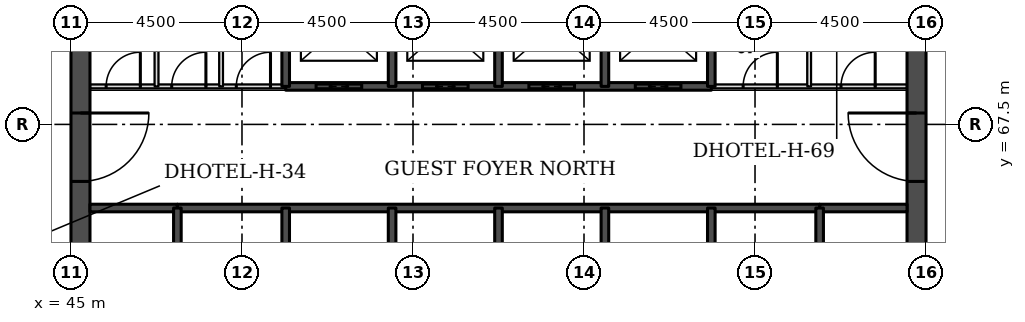
"""IFC4 building model, lengths in metres.
Left out: names, types, materials, properties, quantities, classifications, styles, units other than length and angle.
Written with IfcOpenShell. Run it as: python <this file> out.ifc"""

import sys

from ifc_helpers import new_model, si_unit, direction, frame, frame_2d, origin, place, context, subcontext, project, spatial, rectangle, extrude, element, fill, save


model = new_model("IFC4")
c1 = context("Model", 3, precision=1e-05, world=origin(), true_north=direction((0.0, 1.0)))
c2 = subcontext(c1, "Body", "Model", "MODEL_VIEW")
j1 = project(units=[si_unit("LENGTHUNIT", "METRE"), si_unit("PLANEANGLEUNIT", "RADIAN")], contexts=[c1])
p1 = place(None, origin())
s1 = spatial("IfcSite", under=j1, at=p1, CompositionType="ELEMENT")
p2 = place(p1, origin())
s2 = spatial("IfcBuilding", under=s1, at=p2, CompositionType="ELEMENT")
p3 = place(p2, frame((0.0, 0.0, 46.2)))
s3 = spatial("IfcBuildingStorey", under=s2, at=p3, CompositionType="ELEMENT", Elevation=46.2)
p4 = place(p3, frame((45.25, 49.5, 0.0), z_axis=(0.0, 0.0, 1.0), x_axis=(0.0, 1.0, 0.0)))
e1 = element("IfcWall", 1, at=p4, inside=s3, PredefinedType="SHEAR", context=c2, shape_type="SweptSolid", body=[
    extrude(rectangle(XDim=22.5, YDim=0.5, at=frame_2d((11.25, 0.0))), origin(), (0.0, 0.0, 1.0), 3.3),
])
p5 = place(p4, frame((4.2, 0.0, 0.0)))
e2 = element("IfcOpeningElement", 2, at=p5, cuts=e1, PredefinedType="OPENING", context=c2, shape_type="SweptSolid", body=[
    extrude(rectangle(XDim=1.8, YDim=2.1, at=frame_2d((0.9, 1.05))), frame((0.0, 0.26, 0.0), z_axis=(0.0, -1.0, 0.0), x_axis=(1.0, 0.0, 0.0)), (0.0, 0.0, 1.0), 0.52),
])
p6 = place(p4, frame((6.9, 0.0, 0.0)))
e3 = element("IfcOpeningElement", 3, at=p6, cuts=e1, PredefinedType="OPENING", context=c2, shape_type="SweptSolid", body=[
    extrude(rectangle(XDim=1.1, YDim=2.1, at=frame_2d((0.55, 1.05))), frame((0.0, 0.26, 0.0), z_axis=(0.0, -1.0, 0.0), x_axis=(1.0, 0.0, 0.0)), (0.0, 0.0, 1.0), 0.52),
])
p7 = place(p4, frame((13.6, 0.0, 0.0)))
e4 = element("IfcOpeningElement", 4, at=p7, cuts=e1, PredefinedType="OPENING", context=c2, shape_type="SweptSolid", body=[
    extrude(rectangle(XDim=1.1, YDim=2.1, at=frame_2d((0.55, 1.05))), frame((0.0, 0.26, 0.0), z_axis=(0.0, -1.0, 0.0), x_axis=(1.0, 0.0, 0.0)), (0.0, 0.0, 1.0), 0.52),
])
p8 = place(p4, frame((16.5, 0.0, 0.0)))
e5 = element("IfcOpeningElement", 5, at=p8, cuts=e1, PredefinedType="OPENING", context=c2, shape_type="SweptSolid", body=[
    extrude(rectangle(XDim=1.8, YDim=2.1, at=frame_2d((0.9, 1.05))), frame((0.0, 0.26, 0.0), z_axis=(0.0, -1.0, 0.0), x_axis=(1.0, 0.0, 0.0)), (0.0, 0.0, 1.0), 0.52),
])
p9 = place(p3, frame((67.25, 49.5, 0.0), z_axis=(0.0, 0.0, 1.0), x_axis=(0.0, 1.0, 0.0)))
e6 = element("IfcWall", 6, at=p9, inside=s3, PredefinedType="SHEAR", context=c2, shape_type="SweptSolid", body=[
    extrude(rectangle(XDim=22.5, YDim=0.5, at=frame_2d((11.25, 0.0))), origin(), (0.0, 0.0, 1.0), 3.3),
])
p10 = place(p9, frame((4.2, 0.0, 0.0)))
e7 = element("IfcOpeningElement", 7, at=p10, cuts=e6, PredefinedType="OPENING", context=c2, shape_type="SweptSolid", body=[
    extrude(rectangle(XDim=1.8, YDim=2.1, at=frame_2d((0.9, 1.05))), frame((0.0, 0.26, 0.0), z_axis=(0.0, -1.0, 0.0), x_axis=(1.0, 0.0, 0.0)), (0.0, 0.0, 1.0), 0.52),
])
p11 = place(p9, frame((6.9, 0.0, 0.0)))
e8 = element("IfcOpeningElement", 8, at=p11, cuts=e6, PredefinedType="OPENING", context=c2, shape_type="SweptSolid", body=[
    extrude(rectangle(XDim=1.1, YDim=2.1, at=frame_2d((0.55, 1.05))), frame((0.0, 0.26, 0.0), z_axis=(0.0, -1.0, 0.0), x_axis=(1.0, 0.0, 0.0)), (0.0, 0.0, 1.0), 0.52),
])
p12 = place(p9, frame((13.6, 0.0, 0.0)))
e9 = element("IfcOpeningElement", 9, at=p12, cuts=e6, PredefinedType="OPENING", context=c2, shape_type="SweptSolid", body=[
    extrude(rectangle(XDim=1.1, YDim=2.1, at=frame_2d((0.55, 1.05))), frame((0.0, 0.26, 0.0), z_axis=(0.0, -1.0, 0.0), x_axis=(1.0, 0.0, 0.0)), (0.0, 0.0, 1.0), 0.52),
])
p13 = place(p9, frame((16.5, 0.0, 0.0)))
e10 = element("IfcOpeningElement", 10, at=p13, cuts=e6, PredefinedType="OPENING", context=c2, shape_type="SweptSolid", body=[
    extrude(rectangle(XDim=1.8, YDim=2.1, at=frame_2d((0.9, 1.05))), frame((0.0, 0.26, 0.0), z_axis=(0.0, -1.0, 0.0), x_axis=(1.0, 0.0, 0.0)), (0.0, 0.0, 1.0), 0.52),
])
for number, where, z_axis, x_axis in (
    (11, (45.5, 65.3, 0.0), (0.0, 0.0, 1.0), (1.0, 0.0, 0.0)),
    (12, (64.7, 65.3, 0.0), (0.0, 0.0, 1.0), (1.0, 0.0, 0.0)),
):
    element("IfcWall", number, at=place(p3, frame(where, z_axis=z_axis, x_axis=x_axis)), inside=s3, PredefinedType="SOLIDWALL", context=c2, shape_type="SweptSolid", body=[
        extrude(rectangle(XDim=2.3, YDim=0.2, at=frame_2d((1.15, 0.0))), origin(), (0.0, 0.0, 1.0), 3.08),
    ])
p14 = place(p3, frame((47.8, 65.3, 0.0), z_axis=(0.0, 0.0, 1.0), x_axis=(1.0, 0.0, 0.0)))
e13 = element("IfcWall", 13, at=p14, inside=s3, PredefinedType="SOLIDWALL", context=c2, shape_type="SweptSolid", body=[
    extrude(rectangle(XDim=16.9, YDim=0.2, at=frame_2d((8.45, 0.0))), origin(), (0.0, 0.0, 1.0), 3.08),
])
p15 = place(p3, frame((45.5, 68.5, 0.0), z_axis=(0.0, 0.0, 1.0), x_axis=(1.0, 0.0, 0.0)))
e14 = element("IfcWall", 14, at=p15, inside=s3, PredefinedType="PARTITIONING", context=c2, shape_type="SweptSolid", body=[
    extrude(rectangle(XDim=5.15, YDim=0.1, at=frame_2d((2.575, 0.0))), origin(), (0.0, 0.0, 1.0), 3.08),
])
p16 = place(p15, frame((0.426, 0.0, 0.0)))
e15 = element("IfcOpeningElement", 15, at=p16, cuts=e14, PredefinedType="OPENING", context=c2, shape_type="SweptSolid", body=[
    extrude(rectangle(XDim=0.9, YDim=2.1, at=frame_2d((0.45, 1.05))), frame((0.0, 0.06, 0.0), z_axis=(0.0, -1.0, 0.0), x_axis=(1.0, 0.0, 0.0)), (0.0, 0.0, 1.0), 0.12),
])
p17 = place(p15, frame((2.151, 0.0, 0.0)))
e16 = element("IfcOpeningElement", 16, at=p17, cuts=e14, PredefinedType="OPENING", context=c2, shape_type="SweptSolid", body=[
    extrude(rectangle(XDim=0.9, YDim=2.1, at=frame_2d((0.45, 1.05))), frame((0.0, 0.06, 0.0), z_axis=(0.0, -1.0, 0.0), x_axis=(1.0, 0.0, 0.0)), (0.0, 0.0, 1.0), 0.12),
])
p18 = place(p15, frame((3.85, 0.0, 0.0)))
e17 = element("IfcOpeningElement", 17, at=p18, cuts=e14, PredefinedType="OPENING", context=c2, shape_type="SweptSolid", body=[
    extrude(rectangle(XDim=0.9, YDim=2.1, at=frame_2d((0.45, 1.05))), frame((0.0, 0.06, 0.0), z_axis=(0.0, -1.0, 0.0), x_axis=(1.0, 0.0, 0.0)), (0.0, 0.0, 1.0), 0.12),
])
p19 = place(p3, frame((61.85, 68.5, 0.0), z_axis=(0.0, 0.0, 1.0), x_axis=(1.0, 0.0, 0.0)))
e18 = element("IfcWall", 18, at=p19, inside=s3, PredefinedType="PARTITIONING", context=c2, shape_type="SweptSolid", body=[
    extrude(rectangle(XDim=5.15, YDim=0.1, at=frame_2d((2.575, 0.0))), origin(), (0.0, 0.0, 1.0), 3.08),
])
p20 = place(p19, frame((3.413, 0.0, 0.0)))
e19 = element("IfcOpeningElement", 19, at=p20, cuts=e18, PredefinedType="OPENING", context=c2, shape_type="SweptSolid", body=[
    extrude(rectangle(XDim=0.9, YDim=2.1, at=frame_2d((0.45, 1.05))), frame((0.0, 0.06, 0.0), z_axis=(0.0, -1.0, 0.0), x_axis=(1.0, 0.0, 0.0)), (0.0, 0.0, 1.0), 0.12),
])
p21 = place(p19, frame((0.837, 0.0, 0.0)))
e20 = element("IfcOpeningElement", 20, at=p21, cuts=e18, PredefinedType="OPENING", context=c2, shape_type="SweptSolid", body=[
    extrude(rectangle(XDim=0.9, YDim=2.1, at=frame_2d((0.45, 1.05))), frame((0.0, 0.06, 0.0), z_axis=(0.0, -1.0, 0.0), x_axis=(1.0, 0.0, 0.0)), (0.0, 0.0, 1.0), 0.12),
])
p22 = place(p3, frame((50.65, 68.5, 0.0), z_axis=(0.0, 0.0, 1.0), x_axis=(1.0, 0.0, 0.0)))
e21 = element("IfcWall", 21, at=p22, inside=s3, PredefinedType="SOLIDWALL", context=c2, shape_type="SweptSolid", body=[
    extrude(rectangle(XDim=11.2, YDim=0.2, at=frame_2d((5.6, 0.0))), origin(), (0.0, 0.0, 1.0), 3.08),
])
p23 = place(p22, frame((0.8, 0.0, 0.0)))
e22 = element("IfcOpeningElement", 22, at=p23, cuts=e21, PredefinedType="OPENING", context=c2, shape_type="SweptSolid", body=[
    extrude(rectangle(XDim=1.2, YDim=2.1, at=frame_2d((0.6, 1.05))), frame((0.0, 0.11, 0.0), z_axis=(0.0, -1.0, 0.0), x_axis=(1.0, 0.0, 0.0)), (0.0, 0.0, 1.0), 0.22),
])
p24 = place(p22, frame((3.6, 0.0, 0.0)))
e23 = element("IfcOpeningElement", 23, at=p24, cuts=e21, PredefinedType="OPENING", context=c2, shape_type="SweptSolid", body=[
    extrude(rectangle(XDim=1.2, YDim=2.1, at=frame_2d((0.6, 1.05))), frame((0.0, 0.11, 0.0), z_axis=(0.0, -1.0, 0.0), x_axis=(1.0, 0.0, 0.0)), (0.0, 0.0, 1.0), 0.22),
])
p25 = place(p22, frame((6.4, 0.0, 0.0)))
e24 = element("IfcOpeningElement", 24, at=p25, cuts=e21, PredefinedType="OPENING", context=c2, shape_type="SweptSolid", body=[
    extrude(rectangle(XDim=1.2, YDim=2.1, at=frame_2d((0.6, 1.05))), frame((0.0, 0.11, 0.0), z_axis=(0.0, -1.0, 0.0), x_axis=(1.0, 0.0, 0.0)), (0.0, 0.0, 1.0), 0.22),
])
p26 = place(p22, frame((9.2, 0.0, 0.0)))
e25 = element("IfcOpeningElement", 25, at=p26, cuts=e21, PredefinedType="OPENING", context=c2, shape_type="SweptSolid", body=[
    extrude(rectangle(XDim=1.2, YDim=2.1, at=frame_2d((0.6, 1.05))), frame((0.0, 0.11, 0.0), z_axis=(0.0, -1.0, 0.0), x_axis=(1.0, 0.0, 0.0)), (0.0, 0.0, 1.0), 0.22),
])
p27 = place(p3, frame((47.251, 68.5, 0.0), z_axis=(0.0, 0.0, 1.0), x_axis=(0.0, 1.0, 0.0)))
e26 = element("IfcWall", 26, at=p27, inside=s3, PredefinedType="PARTITIONING", context=c2, shape_type="SweptSolid", body=[
    extrude(rectangle(XDim=3.0, YDim=0.1, at=frame_2d((1.5, 0.0))), origin(), (0.0, 0.0, 1.0), 3.08),
])
p28 = place(p3, frame((47.8, 62.0, 0.0), z_axis=(0.0, 0.0, 1.0), x_axis=(0.0, 1.0, 0.0)))
e27 = element("IfcWall", 27, at=p28, inside=s3, PredefinedType="SOLIDWALL", context=c2, shape_type="SweptSolid", body=[
    extrude(rectangle(XDim=3.3, YDim=0.2, at=frame_2d((1.65, 0.0))), origin(), (0.0, 0.0, 1.0), 3.08),
])
p29 = place(p28, frame((1.1, 0.0, 0.0)))
e28 = element("IfcOpeningElement", 28, at=p29, cuts=e27, PredefinedType="OPENING", context=c2, shape_type="SweptSolid", body=[
    extrude(rectangle(XDim=1.1, YDim=2.1, at=frame_2d((0.55, 1.05))), frame((0.0, 0.11, 0.0), z_axis=(0.0, -1.0, 0.0), x_axis=(1.0, 0.0, 0.0)), (0.0, 0.0, 1.0), 0.22),
])
p30 = place(p3, frame((48.95, 68.5, 0.0), z_axis=(0.0, 0.0, 1.0), x_axis=(0.0, 1.0, 0.0)))
e29 = element("IfcWall", 29, at=p30, inside=s3, PredefinedType="PARTITIONING", context=c2, shape_type="SweptSolid", body=[
    extrude(rectangle(XDim=3.0, YDim=0.1, at=frame_2d((1.5, 0.0))), origin(), (0.0, 0.0, 1.0), 3.08),
])
p31 = place(p3, frame((50.65, 62.0, 0.0), z_axis=(0.0, 0.0, 1.0), x_axis=(0.0, 1.0, 0.0)))
e30 = element("IfcWall", 30, at=p31, inside=s3, PredefinedType="SOLIDWALL", context=c2, shape_type="SweptSolid", body=[
    extrude(rectangle(XDim=3.3, YDim=0.2, at=frame_2d((1.65, 0.0))), origin(), (0.0, 0.0, 1.0), 3.08),
])
p32 = place(p3, frame((50.65, 68.5, 0.0), z_axis=(0.0, 0.0, 1.0), x_axis=(0.0, 1.0, 0.0)))
e31 = element("IfcWall", 31, at=p32, inside=s3, PredefinedType="SOLIDWALL", context=c2, shape_type="SweptSolid", body=[
    extrude(rectangle(XDim=3.0, YDim=0.2, at=frame_2d((1.5, 0.0))), origin(), (0.0, 0.0, 1.0), 3.08),
])
p33 = place(p3, frame((53.45, 62.5, 0.0), z_axis=(0.0, 0.0, 1.0), x_axis=(0.0, 1.0, 0.0)))
e32 = element("IfcWall", 32, at=p33, inside=s3, PredefinedType="SOLIDWALL", context=c2, shape_type="SweptSolid", body=[
    extrude(rectangle(XDim=2.8, YDim=0.2, at=frame_2d((1.4, 0.0))), origin(), (0.0, 0.0, 1.0), 3.08),
])
p34 = place(p3, frame((53.45, 68.5, 0.0), z_axis=(0.0, 0.0, 1.0), x_axis=(0.0, 1.0, 0.0)))
e33 = element("IfcWall", 33, at=p34, inside=s3, PredefinedType="SOLIDWALL", context=c2, shape_type="SweptSolid", body=[
    extrude(rectangle(XDim=3.0, YDim=0.2, at=frame_2d((1.5, 0.0))), origin(), (0.0, 0.0, 1.0), 3.08),
])
p35 = place(p3, frame((56.25, 62.5, 0.0), z_axis=(0.0, 0.0, 1.0), x_axis=(0.0, 1.0, 0.0)))
e34 = element("IfcWall", 34, at=p35, inside=s3, PredefinedType="SOLIDWALL", context=c2, shape_type="SweptSolid", body=[
    extrude(rectangle(XDim=2.8, YDim=0.2, at=frame_2d((1.4, 0.0))), origin(), (0.0, 0.0, 1.0), 3.08),
])
p36 = place(p3, frame((56.25, 68.5, 0.0), z_axis=(0.0, 0.0, 1.0), x_axis=(0.0, 1.0, 0.0)))
e35 = element("IfcWall", 35, at=p36, inside=s3, PredefinedType="SOLIDWALL", context=c2, shape_type="SweptSolid", body=[
    extrude(rectangle(XDim=3.0, YDim=0.2, at=frame_2d((1.5, 0.0))), origin(), (0.0, 0.0, 1.0), 3.08),
])
p37 = place(p3, frame((59.05, 62.5, 0.0), z_axis=(0.0, 0.0, 1.0), x_axis=(0.0, 1.0, 0.0)))
e36 = element("IfcWall", 36, at=p37, inside=s3, PredefinedType="SOLIDWALL", context=c2, shape_type="SweptSolid", body=[
    extrude(rectangle(XDim=2.8, YDim=0.2, at=frame_2d((1.4, 0.0))), origin(), (0.0, 0.0, 1.0), 3.08),
])
p38 = place(p3, frame((59.05, 68.5, 0.0), z_axis=(0.0, 0.0, 1.0), x_axis=(0.0, 1.0, 0.0)))
e37 = element("IfcWall", 37, at=p38, inside=s3, PredefinedType="SOLIDWALL", context=c2, shape_type="SweptSolid", body=[
    extrude(rectangle(XDim=3.0, YDim=0.2, at=frame_2d((1.5, 0.0))), origin(), (0.0, 0.0, 1.0), 3.08),
])
p39 = place(p3, frame((61.85, 62.0, 0.0), z_axis=(0.0, 0.0, 1.0), x_axis=(0.0, 1.0, 0.0)))
e38 = element("IfcWall", 38, at=p39, inside=s3, PredefinedType="SOLIDWALL", context=c2, shape_type="SweptSolid", body=[
    extrude(rectangle(XDim=3.3, YDim=0.2, at=frame_2d((1.65, 0.0))), origin(), (0.0, 0.0, 1.0), 3.08),
])
p40 = place(p3, frame((61.85, 68.5, 0.0), z_axis=(0.0, 0.0, 1.0), x_axis=(0.0, 1.0, 0.0)))
e39 = element("IfcWall", 39, at=p40, inside=s3, PredefinedType="SOLIDWALL", context=c2, shape_type="SweptSolid", body=[
    extrude(rectangle(XDim=3.0, YDim=0.2, at=frame_2d((1.5, 0.0))), origin(), (0.0, 0.0, 1.0), 3.08),
])
p41 = place(p3, frame((64.425, 68.5, 0.0), z_axis=(0.0, 0.0, 1.0), x_axis=(0.0, 1.0, 0.0)))
e40 = element("IfcWall", 40, at=p41, inside=s3, PredefinedType="PARTITIONING", context=c2, shape_type="SweptSolid", body=[
    extrude(rectangle(XDim=3.0, YDim=0.1, at=frame_2d((1.5, 0.0))), origin(), (0.0, 0.0, 1.0), 3.08),
])
p42 = place(p3, frame((64.7, 62.0, 0.0), z_axis=(0.0, 0.0, 1.0), x_axis=(0.0, 1.0, 0.0)))
e41 = element("IfcWall", 41, at=p42, inside=s3, PredefinedType="SOLIDWALL", context=c2, shape_type="SweptSolid", body=[
    extrude(rectangle(XDim=3.3, YDim=0.2, at=frame_2d((1.65, 0.0))), origin(), (0.0, 0.0, 1.0), 3.08),
])
p43 = place(p42, frame((1.1, 0.0, 0.0)))
e42 = element("IfcOpeningElement", 42, at=p43, cuts=e41, PredefinedType="OPENING", context=c2, shape_type="SweptSolid", body=[
    extrude(rectangle(XDim=1.1, YDim=2.1, at=frame_2d((0.55, 1.05))), frame((0.0, 0.11, 0.0), z_axis=(0.0, -1.0, 0.0), x_axis=(1.0, 0.0, 0.0)), (0.0, 0.0, 1.0), 0.22),
])
p44 = place(p23, origin())
e43 = element("IfcDoor", 43, at=p44, inside=s3, OperationType="DOUBLE_DOOR_SLIDING", PredefinedType="DOOR", context=c2, shape_type="SweptSolid", body=[
    extrude(rectangle(XDim=1.2, YDim=2.1, at=frame_2d((0.6, 1.05))), frame((0.0, 0.025, 0.0), z_axis=(0.0, -1.0, 0.0), x_axis=(1.0, 0.0, 0.0)), (0.0, 0.0, 1.0), 0.05),
])
fill(e22, e43)
p45 = place(p24, origin())
e44 = element("IfcDoor", 44, at=p45, inside=s3, OperationType="DOUBLE_DOOR_SLIDING", PredefinedType="DOOR", context=c2, shape_type="SweptSolid", body=[
    extrude(rectangle(XDim=1.2, YDim=2.1, at=frame_2d((0.6, 1.05))), frame((0.0, 0.025, 0.0), z_axis=(0.0, -1.0, 0.0), x_axis=(1.0, 0.0, 0.0)), (0.0, 0.0, 1.0), 0.05),
])
fill(e23, e44)
p46 = place(p25, origin())
e45 = element("IfcDoor", 45, at=p46, inside=s3, OperationType="DOUBLE_DOOR_SLIDING", PredefinedType="DOOR", context=c2, shape_type="SweptSolid", body=[
    extrude(rectangle(XDim=1.2, YDim=2.1, at=frame_2d((0.6, 1.05))), frame((0.0, 0.025, 0.0), z_axis=(0.0, -1.0, 0.0), x_axis=(1.0, 0.0, 0.0)), (0.0, 0.0, 1.0), 0.05),
])
fill(e24, e45)
p47 = place(p26, origin())
e46 = element("IfcDoor", 46, at=p47, inside=s3, OperationType="DOUBLE_DOOR_SLIDING", PredefinedType="DOOR", context=c2, shape_type="SweptSolid", body=[
    extrude(rectangle(XDim=1.2, YDim=2.1, at=frame_2d((0.6, 1.05))), frame((0.0, 0.025, 0.0), z_axis=(0.0, -1.0, 0.0), x_axis=(1.0, 0.0, 0.0)), (0.0, 0.0, 1.0), 0.05),
])
fill(e25, e46)
p48 = place(p8, frame((1.8, 0.0, 0.0), z_axis=(0.0, 0.0, 1.0), x_axis=(-1.0, 0.0, 0.0)))
e47 = element("IfcDoor", 47, at=p48, inside=s3, OperationType="SINGLE_SWING_LEFT", PredefinedType="DOOR", context=c2, shape_type="SweptSolid", body=[
    extrude(rectangle(XDim=1.8, YDim=2.1, at=frame_2d((0.9, 1.05))), frame((0.0, 0.025, 0.0), z_axis=(0.0, -1.0, 0.0), x_axis=(1.0, 0.0, 0.0)), (0.0, 0.0, 1.0), 0.05),
])
fill(e5, e47)
p49 = place(p13, origin())
e48 = element("IfcDoor", 48, at=p49, inside=s3, OperationType="SINGLE_SWING_RIGHT", PredefinedType="DOOR", context=c2, shape_type="SweptSolid", body=[
    extrude(rectangle(XDim=1.8, YDim=2.1, at=frame_2d((0.9, 1.05))), frame((0.0, 0.025, 0.0), z_axis=(0.0, -1.0, 0.0), x_axis=(1.0, 0.0, 0.0)), (0.0, 0.0, 1.0), 0.05),
])
fill(e10, e48)
p50 = place(p20, origin())
e49 = element("IfcDoor", 49, at=p50, inside=s3, OperationType="SINGLE_SWING_RIGHT", PredefinedType="DOOR", context=c2, shape_type="SweptSolid", body=[
    extrude(rectangle(XDim=0.9, YDim=2.1, at=frame_2d((0.45, 1.05))), frame((0.0, 0.025, 0.0), z_axis=(0.0, -1.0, 0.0), x_axis=(1.0, 0.0, 0.0)), (0.0, 0.0, 1.0), 0.05),
])
fill(e19, e49)
p51 = place(p21, origin())
e50 = element("IfcDoor", 50, at=p51, inside=s3, OperationType="SINGLE_SWING_RIGHT", PredefinedType="DOOR", context=c2, shape_type="SweptSolid", body=[
    extrude(rectangle(XDim=0.9, YDim=2.1, at=frame_2d((0.45, 1.05))), frame((0.0, 0.025, 0.0), z_axis=(0.0, -1.0, 0.0), x_axis=(1.0, 0.0, 0.0)), (0.0, 0.0, 1.0), 0.05),
])
fill(e20, e50)
p52 = place(p16, origin())
e51 = element("IfcDoor", 51, at=p52, inside=s3, OperationType="SINGLE_SWING_RIGHT", PredefinedType="DOOR", context=c2, shape_type="SweptSolid", body=[
    extrude(rectangle(XDim=0.9, YDim=2.1, at=frame_2d((0.45, 1.05))), frame((0.0, 0.025, 0.0), z_axis=(0.0, -1.0, 0.0), x_axis=(1.0, 0.0, 0.0)), (0.0, 0.0, 1.0), 0.05),
])
fill(e15, e51)
p53 = place(p17, origin())
e52 = element("IfcDoor", 52, at=p53, inside=s3, OperationType="SINGLE_SWING_RIGHT", PredefinedType="DOOR", context=c2, shape_type="SweptSolid", body=[
    extrude(rectangle(XDim=0.9, YDim=2.1, at=frame_2d((0.45, 1.05))), frame((0.0, 0.025, 0.0), z_axis=(0.0, -1.0, 0.0), x_axis=(1.0, 0.0, 0.0)), (0.0, 0.0, 1.0), 0.05),
])
fill(e16, e52)
p54 = place(p18, origin())
e53 = element("IfcDoor", 53, at=p54, inside=s3, OperationType="SINGLE_SWING_RIGHT", PredefinedType="DOOR", context=c2, shape_type="SweptSolid", body=[
    extrude(rectangle(XDim=0.9, YDim=2.1, at=frame_2d((0.45, 1.05))), frame((0.0, 0.025, 0.0), z_axis=(0.0, -1.0, 0.0), x_axis=(1.0, 0.0, 0.0)), (0.0, 0.0, 1.0), 0.05),
])
fill(e17, e53)
save(model, sys.argv[1])
